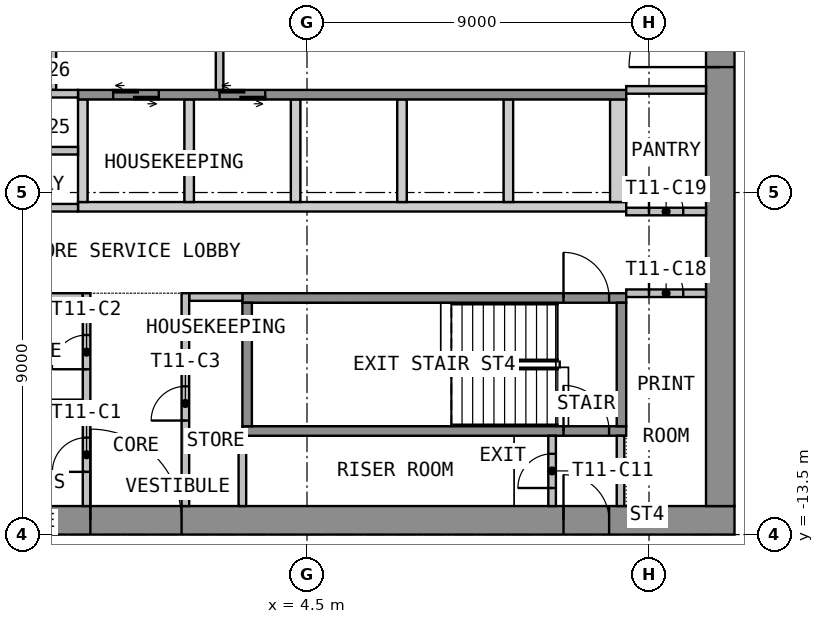
"""IFC4 building model, lengths in metres.
Left out: names, types, materials, properties, quantities, classifications, styles, units other than length and angle.
Written with IfcOpenShell. Run it as: python <this file> out.ifc"""

import sys

from ifc_helpers import new_model, si_unit, direction, frame, frame_2d, origin, place, context, subcontext, project, spatial, polyline, rectangle, outline, extrude, element, fill, save


model = new_model("IFC4")
c1 = context("Model", 3, precision=1e-05, world=origin(), true_north=direction((0.0, 1.0)))
c2 = subcontext(c1, "Body", "Model", "MODEL_VIEW")
j1 = project(units=[si_unit("LENGTHUNIT", "METRE"), si_unit("PLANEANGLEUNIT", "RADIAN")], contexts=[c1])
p1 = place(None, origin())
s1 = spatial("IfcSite", under=j1, at=p1, CompositionType="ELEMENT")
p2 = place(p1, origin())
s2 = spatial("IfcBuilding", under=s1, at=p2, CompositionType="ELEMENT")
p3 = place(p2, frame((0.0, 0.0, 156.0)))
s3 = spatial("IfcBuildingStorey", under=s2, at=p3, CompositionType="ELEMENT", Elevation=156.0)
p4 = place(p3, frame((-15.75, -13.125, 0.0), z_axis=(0.0, 0.0, 1.0), x_axis=(1.0, 0.0, 0.0)))
e1 = element("IfcWall", 1, at=p4, inside=s3, PredefinedType="SHEAR", context=c2, shape_type="SweptSolid", body=[
    extrude(rectangle(XDim=31.5, YDim=0.75, at=frame_2d((15.75, 0.0))), origin(), (0.0, 0.0, 1.0), 3.575),
])
p5 = place(p4, frame((14.55, 0.0, 0.0)))
e2 = element("IfcOpeningElement", 2, at=p5, cuts=e1, PredefinedType="OPENING", context=c2, shape_type="SweptSolid", body=[
    extrude(rectangle(XDim=2.4, YDim=2.1, at=frame_2d((1.2, 1.05))), frame((0.0, 0.385, 0.0), z_axis=(0.0, -1.0, 0.0), x_axis=(1.0, 0.0, 0.0)), (0.0, 0.0, 1.0), 0.77),
])
p6 = place(p4, frame((3.3, 0.0, 0.0)))
e3 = element("IfcOpeningElement", 3, at=p6, cuts=e1, PredefinedType="OPENING", context=c2, shape_type="SweptSolid", body=[
    extrude(rectangle(XDim=1.2, YDim=2.1, at=frame_2d((0.6, 1.05))), frame((0.0, 0.385, 0.0), z_axis=(0.0, -1.0, 0.0), x_axis=(1.0, 0.0, 0.0)), (0.0, 0.0, 1.0), 0.77),
])
p7 = place(p4, frame((27.0, 0.0, 0.0)))
e4 = element("IfcOpeningElement", 4, at=p7, cuts=e1, PredefinedType="OPENING", context=c2, shape_type="SweptSolid", body=[
    extrude(rectangle(XDim=1.2, YDim=2.1, at=frame_2d((0.6, 1.05))), frame((0.0, 0.385, 0.0), z_axis=(0.0, -1.0, 0.0), x_axis=(1.0, 0.0, 0.0)), (0.0, 0.0, 1.0), 0.77),
])
p8 = place(p3, frame((15.375, -12.75, 0.0), z_axis=(0.0, 0.0, 1.0), x_axis=(0.0, 1.0, 0.0)))
e5 = element("IfcWall", 5, at=p8, inside=s3, PredefinedType="SHEAR", context=c2, shape_type="SweptSolid", body=[
    extrude(rectangle(XDim=25.5, YDim=0.75, at=frame_2d((12.75, 0.0))), origin(), (0.0, 0.0, 1.0), 3.575),
])
p9 = place(p8, frame((11.55, 0.0, 0.0)))
e6 = element("IfcOpeningElement", 6, at=p9, cuts=e5, PredefinedType="OPENING", context=c2, shape_type="SweptSolid", body=[
    extrude(rectangle(XDim=2.4, YDim=2.1, at=frame_2d((1.2, 1.05))), frame((0.0, 0.385, 0.0), z_axis=(0.0, -1.0, 0.0), x_axis=(1.0, 0.0, 0.0)), (0.0, 0.0, 1.0), 0.77),
])
p10 = place(p3, origin())
e7 = element("IfcWall", 7, at=p10, inside=s3, PredefinedType="SHEAR", context=c2, shape_type="SweptSolid", body=[
    extrude(outline(polyline([(-1.525, -5.0), (12.9, -5.0), (12.9, -4.75), (-1.525, -4.75), (-1.525, -5.0)])), origin(), (0.0, 0.0, 1.0), 3.575),
])
p11 = place(p3, origin())
e8 = element("IfcWall", 8, at=p11, inside=s3, PredefinedType="SHEAR", context=c2, shape_type="SweptSolid", body=[
    extrude(outline(polyline([(-1.525, -4.75), (-1.275, -4.75), (-1.275, -2.05), (-1.525, -2.05), (-1.525, -4.75)])), origin(), (0.0, 0.0, 1.0), 3.575),
])
p12 = place(p3, origin())
e9 = element("IfcWall", 9, at=p12, inside=s3, PredefinedType="SHEAR", context=c2, shape_type="SweptSolid", body=[
    extrude(outline(polyline([(1.275, -4.75), (1.525, -4.75), (1.525, -2.05), (1.275, -2.05), (1.275, -4.75)])), origin(), (0.0, 0.0, 1.0), 3.575),
])
p13 = place(p3, origin())
e10 = element("IfcWall", 10, at=p13, inside=s3, PredefinedType="SHEAR", context=c2, shape_type="SweptSolid", body=[
    extrude(outline(polyline([(4.075, -4.75), (4.325, -4.75), (4.325, -2.05), (4.075, -2.05), (4.075, -4.75)])), origin(), (0.0, 0.0, 1.0), 3.575),
])
p14 = place(p3, origin())
e11 = element("IfcWall", 11, at=p14, inside=s3, PredefinedType="SHEAR", context=c2, shape_type="SweptSolid", body=[
    extrude(outline(polyline([(6.875, -4.75), (7.125, -4.75), (7.125, -2.05), (6.875, -2.05), (6.875, -4.75)])), origin(), (0.0, 0.0, 1.0), 3.575),
])
p15 = place(p3, origin())
e12 = element("IfcWall", 12, at=p15, inside=s3, PredefinedType="SHEAR", context=c2, shape_type="SweptSolid", body=[
    extrude(outline(polyline([(9.675, -4.75), (9.925, -4.75), (9.925, -2.05), (9.675, -2.05), (9.675, -4.75)])), origin(), (0.0, 0.0, 1.0), 3.575),
])
p16 = place(p3, origin())
e13 = element("IfcWall", 13, at=p16, inside=s3, PredefinedType="SHEAR", context=c2, shape_type="SweptSolid", body=[
    extrude(outline(polyline([(12.475, -4.75), (12.9, -4.75), (12.9, -2.05), (12.475, -2.05), (12.475, -4.75)])), origin(), (0.0, 0.0, 1.0), 3.575),
])
p17 = place(p3, frame((-1.525, -1.925, 0.0), z_axis=(0.0, 0.0, 1.0), x_axis=(1.0, 0.0, 0.0)))
e14 = element("IfcWall", 14, at=p17, inside=s3, PredefinedType="SHEAR", context=c2, shape_type="SweptSolid", body=[
    extrude(rectangle(XDim=14.425, YDim=0.25, at=frame_2d((7.212, 0.0))), origin(), (0.0, 0.0, 1.0), 3.575),
])
p18 = place(p17, frame((0.925, 0.0, 0.0)))
e15 = element("IfcOpeningElement", 15, at=p18, cuts=e14, PredefinedType="OPENING", context=c2, shape_type="SweptSolid", body=[
    extrude(rectangle(XDim=1.2, YDim=2.1, at=frame_2d((0.6, 1.05))), frame((0.0, 0.135, 0.0), z_axis=(0.0, -1.0, 0.0), x_axis=(1.0, 0.0, 0.0)), (0.0, 0.0, 1.0), 0.27),
])
p19 = place(p17, frame((3.725, 0.0, 0.0)))
e16 = element("IfcOpeningElement", 16, at=p19, cuts=e14, PredefinedType="OPENING", context=c2, shape_type="SweptSolid", body=[
    extrude(rectangle(XDim=1.2, YDim=2.1, at=frame_2d((0.6, 1.05))), frame((0.0, 0.135, 0.0), z_axis=(0.0, -1.0, 0.0), x_axis=(1.0, 0.0, 0.0)), (0.0, 0.0, 1.0), 0.27),
])
p20 = place(p3, frame((-2.2, -1.8, 0.0), z_axis=(0.0, 0.0, 1.0), x_axis=(0.0, 1.0, 0.0)))
e17 = element("IfcWall", 17, at=p20, inside=s3, PredefinedType="PARTITIONING", context=c2, shape_type="SweptSolid", body=[
    extrude(rectangle(XDim=3.6, YDim=0.2, at=frame_2d((1.8, 0.0))), origin(), (0.0, 0.0, 1.0), 3.575),
])
p21 = place(p20, frame((1.2, 0.0, 0.0)))
e18 = element("IfcOpeningElement", 18, at=p21, cuts=e17, PredefinedType="OPENING", context=c2, shape_type="SweptSolid", body=[
    extrude(rectangle(XDim=1.2, YDim=2.1, at=frame_2d((0.6, 1.05))), frame((0.0, 0.11, 0.0), z_axis=(0.0, -1.0, 0.0), x_axis=(1.0, 0.0, 0.0)), (0.0, 0.0, 1.0), 0.22),
])
p22 = place(p3, frame((2.2, -1.8, 0.0), z_axis=(0.0, 0.0, 1.0), x_axis=(0.0, 1.0, 0.0)))
e19 = element("IfcWall", 19, at=p22, inside=s3, PredefinedType="PARTITIONING", context=c2, shape_type="SweptSolid", body=[
    extrude(rectangle(XDim=3.6, YDim=0.2, at=frame_2d((1.8, 0.0))), origin(), (0.0, 0.0, 1.0), 3.575),
])
p23 = place(p22, frame((1.2, 0.0, 0.0)))
e20 = element("IfcOpeningElement", 20, at=p23, cuts=e19, PredefinedType="OPENING", context=c2, shape_type="SweptSolid", body=[
    extrude(rectangle(XDim=1.2, YDim=2.1, at=frame_2d((0.6, 1.05))), frame((0.0, 0.11, 0.0), z_axis=(0.0, -1.0, 0.0), x_axis=(1.0, 0.0, 0.0)), (0.0, 0.0, 1.0), 0.22),
])
p24 = place(p3, frame((2.8, -10.775, 0.0), z_axis=(0.0, 0.0, 1.0), x_axis=(1.0, 0.0, 0.0)))
e21 = element("IfcWall", 21, at=p24, inside=s3, PredefinedType="SHEAR", context=c2, shape_type="SweptSolid", body=[
    extrude(rectangle(XDim=10.1, YDim=0.25, at=frame_2d((5.05, 0.0))), origin(), (0.0, 0.0, 1.0), 3.575),
])
p25 = place(p24, frame((8.45, 0.0, 0.0)))
e22 = element("IfcOpeningElement", 22, at=p25, cuts=e21, PredefinedType="OPENING", context=c2, shape_type="SweptSolid", body=[
    extrude(rectangle(XDim=1.2, YDim=2.1, at=frame_2d((0.6, 1.05))), frame((0.0, 0.135, 0.0), z_axis=(0.0, -1.0, 0.0), x_axis=(1.0, 0.0, 0.0)), (0.0, 0.0, 1.0), 0.27),
])
p26 = place(p3, frame((2.8, -7.275, 0.0), z_axis=(0.0, 0.0, 1.0), x_axis=(1.0, 0.0, 0.0)))
e23 = element("IfcWall", 23, at=p26, inside=s3, PredefinedType="SHEAR", context=c2, shape_type="SweptSolid", body=[
    extrude(rectangle(XDim=10.1, YDim=0.25, at=frame_2d((5.05, 0.0))), origin(), (0.0, 0.0, 1.0), 3.575),
])
p27 = place(p26, frame((8.45, 0.0, 0.0)))
e24 = element("IfcOpeningElement", 24, at=p27, cuts=e23, PredefinedType="OPENING", context=c2, shape_type="SweptSolid", body=[
    extrude(rectangle(XDim=1.2, YDim=2.1, at=frame_2d((0.6, 1.05))), frame((0.0, 0.135, 0.0), z_axis=(0.0, -1.0, 0.0), x_axis=(1.0, 0.0, 0.0)), (0.0, 0.0, 1.0), 0.27),
])
for number, where, z_axis, x_axis in (
    (25, (2.925, -10.65, 0.0), (0.0, 0.0, 1.0), (0.0, 1.0, 0.0)),
    (26, (12.775, -10.65, 0.0), (0.0, 0.0, 1.0), (0.0, 1.0, 0.0)),
):
    element("IfcWall", number, at=place(p3, frame(where, z_axis=z_axis, x_axis=x_axis)), inside=s3, PredefinedType="SHEAR", context=c2, shape_type="SweptSolid", body=[
        extrude(rectangle(XDim=3.25, YDim=0.25, at=frame_2d((1.625, 0.0))), origin(), (0.0, 0.0, 1.0), 3.575),
    ])
for number, where, z_axis, x_axis in (
    (27, (-2.8, -7.25, 0.0), (0.0, 0.0, 1.0), (1.0, 0.0, 0.0)),
    (28, (-2.8, -10.05, 0.0), (0.0, 0.0, 1.0), (1.0, 0.0, 0.0)),
    (29, (1.4, -7.25, 0.0), (0.0, 0.0, 1.0), (1.0, 0.0, 0.0)),
):
    element("IfcWall", number, at=place(p3, frame(where, z_axis=z_axis, x_axis=x_axis)), inside=s3, PredefinedType="PARTITIONING", context=c2, shape_type="SweptSolid", body=[
        extrude(rectangle(XDim=1.4, YDim=0.2, at=frame_2d((0.7, 0.0))), origin(), (0.0, 0.0, 1.0), 3.575),
    ])
p28 = place(p3, frame((-1.3, -12.75, 0.0), z_axis=(0.0, 0.0, 1.0), x_axis=(0.0, 1.0, 0.0)))
e30 = element("IfcWall", 30, at=p28, inside=s3, PredefinedType="PARTITIONING", context=c2, shape_type="SweptSolid", body=[
    extrude(rectangle(XDim=5.6, YDim=0.2, at=frame_2d((2.8, 0.0))), origin(), (0.0, 0.0, 1.0), 3.575),
])
p29 = place(p28, frame((0.9, 0.0, 0.0)))
e31 = element("IfcOpeningElement", 31, at=p29, cuts=e30, PredefinedType="OPENING", context=c2, shape_type="SweptSolid", body=[
    extrude(rectangle(XDim=0.9, YDim=2.1, at=frame_2d((0.45, 1.05))), frame((0.0, 0.11, 0.0), z_axis=(0.0, -1.0, 0.0), x_axis=(1.0, 0.0, 0.0)), (0.0, 0.0, 1.0), 0.22),
])
p30 = place(p28, frame((3.6, 0.0, 0.0)))
e32 = element("IfcOpeningElement", 32, at=p30, cuts=e30, PredefinedType="OPENING", context=c2, shape_type="SweptSolid", body=[
    extrude(rectangle(XDim=0.9, YDim=2.1, at=frame_2d((0.45, 1.05))), frame((0.0, 0.11, 0.0), z_axis=(0.0, -1.0, 0.0), x_axis=(1.0, 0.0, 0.0)), (0.0, 0.0, 1.0), 0.22),
])
p31 = place(p3, frame((1.3, -12.75, 0.0), z_axis=(0.0, 0.0, 1.0), x_axis=(0.0, 1.0, 0.0)))
e33 = element("IfcWall", 33, at=p31, inside=s3, PredefinedType="PARTITIONING", context=c2, shape_type="SweptSolid", body=[
    extrude(rectangle(XDim=5.6, YDim=0.2, at=frame_2d((2.8, 0.0))), origin(), (0.0, 0.0, 1.0), 3.575),
])
p32 = place(p31, frame((2.25, 0.0, 0.0)))
e34 = element("IfcOpeningElement", 34, at=p32, cuts=e33, PredefinedType="OPENING", context=c2, shape_type="SweptSolid", body=[
    extrude(rectangle(XDim=0.9, YDim=2.1, at=frame_2d((0.45, 1.05))), frame((0.0, 0.11, 0.0), z_axis=(0.0, -1.0, 0.0), x_axis=(1.0, 0.0, 0.0)), (0.0, 0.0, 1.0), 0.22),
])
p33 = place(p3, frame((12.75, -12.75, 0.0), z_axis=(0.0, 0.0, 1.0), x_axis=(0.0, 1.0, 0.0)))
e35 = element("IfcWall", 35, at=p33, inside=s3, PredefinedType="PARTITIONING", context=c2, shape_type="SweptSolid", body=[
    extrude(rectangle(XDim=1.85, YDim=0.2, at=frame_2d((0.925, 0.0))), origin(), (0.0, 0.0, 1.0), 3.575),
])
p34 = place(p3, frame((10.95, -12.75, 0.0), z_axis=(0.0, 0.0, 1.0), x_axis=(0.0, 1.0, 0.0)))
e36 = element("IfcWall", 36, at=p34, inside=s3, PredefinedType="PARTITIONING", context=c2, shape_type="SweptSolid", body=[
    extrude(rectangle(XDim=1.85, YDim=0.2, at=frame_2d((0.925, 0.0))), origin(), (0.0, 0.0, 1.0), 3.575),
])
p35 = place(p34, frame((0.475, 0.0, 0.0)))
e37 = element("IfcOpeningElement", 37, at=p35, cuts=e36, PredefinedType="OPENING", context=c2, shape_type="SweptSolid", body=[
    extrude(rectangle(XDim=0.9, YDim=2.1, at=frame_2d((0.45, 1.05))), frame((0.0, 0.11, 0.0), z_axis=(0.0, -1.0, 0.0), x_axis=(1.0, 0.0, 0.0)), (0.0, 0.0, 1.0), 0.22),
])
p36 = place(p3, frame((12.9, -7.15, 0.0), z_axis=(0.0, 0.0, 1.0), x_axis=(1.0, 0.0, 0.0)))
e38 = element("IfcWall", 38, at=p36, inside=s3, PredefinedType="PARTITIONING", context=c2, shape_type="SweptSolid", body=[
    extrude(rectangle(XDim=2.1, YDim=0.2, at=frame_2d((1.05, 0.0))), origin(), (0.0, 0.0, 1.0), 3.575),
])
p37 = place(p36, frame((0.6, 0.0, 0.0)))
e39 = element("IfcOpeningElement", 39, at=p37, cuts=e38, PredefinedType="OPENING", context=c2, shape_type="SweptSolid", body=[
    extrude(rectangle(XDim=0.9, YDim=2.1, at=frame_2d((0.45, 1.05))), frame((0.0, 0.11, 0.0), z_axis=(0.0, -1.0, 0.0), x_axis=(1.0, 0.0, 0.0)), (0.0, 0.0, 1.0), 0.22),
])
p38 = place(p3, frame((12.9, -5.0, 0.0), z_axis=(0.0, 0.0, 1.0), x_axis=(1.0, 0.0, 0.0)))
e40 = element("IfcWall", 40, at=p38, inside=s3, PredefinedType="PARTITIONING", context=c2, shape_type="SweptSolid", body=[
    extrude(rectangle(XDim=2.1, YDim=0.2, at=frame_2d((1.05, 0.0))), origin(), (0.0, 0.0, 1.0), 3.575),
])
p39 = place(p38, frame((0.6, 0.0, 0.0)))
e41 = element("IfcOpeningElement", 41, at=p39, cuts=e40, PredefinedType="OPENING", context=c2, shape_type="SweptSolid", body=[
    extrude(rectangle(XDim=0.9, YDim=2.1, at=frame_2d((0.45, 1.05))), frame((0.0, 0.11, 0.0), z_axis=(0.0, -1.0, 0.0), x_axis=(1.0, 0.0, 0.0)), (0.0, 0.0, 1.0), 0.22),
])
p40 = place(p3, frame((12.9, -1.8, 0.0), z_axis=(0.0, 0.0, 1.0), x_axis=(1.0, 0.0, 0.0)))
e42 = element("IfcWall", 42, at=p40, inside=s3, PredefinedType="PARTITIONING", context=c2, shape_type="SweptSolid", body=[
    extrude(rectangle(XDim=2.1, YDim=0.2, at=frame_2d((1.05, 0.0))), origin(), (0.0, 0.0, 1.0), 3.575),
])
p41 = place(p3, frame((-4.075, -3.4, 0.0), z_axis=(0.0, 0.0, 1.0), x_axis=(1.0, 0.0, 0.0)))
e43 = element("IfcWall", 43, at=p41, inside=s3, PredefinedType="PARTITIONING", context=c2, shape_type="SweptSolid", body=[
    extrude(rectangle(XDim=2.55, YDim=0.2, at=frame_2d((1.275, 0.0))), origin(), (0.0, 0.0, 1.0), 3.575),
])
p42 = place(p41, frame((0.825, 0.0, 0.0)))
e44 = element("IfcOpeningElement", 44, at=p42, cuts=e43, PredefinedType="OPENING", context=c2, shape_type="SweptSolid", body=[
    extrude(rectangle(XDim=0.9, YDim=2.1, at=frame_2d((0.45, 1.05))), frame((0.0, 0.11, 0.0), z_axis=(0.0, -1.0, 0.0), x_axis=(1.0, 0.0, 0.0)), (0.0, 0.0, 1.0), 0.22),
])
p43 = place(p3, frame((-4.075, -1.9, 0.0), z_axis=(0.0, 0.0, 1.0), x_axis=(1.0, 0.0, 0.0)))
e45 = element("IfcWall", 45, at=p43, inside=s3, PredefinedType="PARTITIONING", context=c2, shape_type="SweptSolid", body=[
    extrude(rectangle(XDim=2.55, YDim=0.2, at=frame_2d((1.275, 0.0))), origin(), (0.0, 0.0, 1.0), 3.575),
])
p44 = place(p43, frame((0.825, 0.0, 0.0)))
e46 = element("IfcOpeningElement", 46, at=p44, cuts=e45, PredefinedType="OPENING", context=c2, shape_type="SweptSolid", body=[
    extrude(rectangle(XDim=0.9, YDim=2.1, at=frame_2d((0.45, 1.05))), frame((0.0, 0.11, 0.0), z_axis=(0.0, -1.0, 0.0), x_axis=(1.0, 0.0, 0.0)), (0.0, 0.0, 1.0), 0.22),
])
p45 = place(p3, frame((-4.075, -4.9, 0.0), z_axis=(0.0, 0.0, 1.0), x_axis=(1.0, 0.0, 0.0)))
e47 = element("IfcWall", 47, at=p45, inside=s3, PredefinedType="PARTITIONING", context=c2, shape_type="SweptSolid", body=[
    extrude(rectangle(XDim=2.55, YDim=0.2, at=frame_2d((1.275, 0.0))), origin(), (0.0, 0.0, 1.0), 3.575),
])
p46 = place(p3, frame((2.8, -10.901, 0.0), z_axis=(0.0, 0.0, 1.0), x_axis=(0.0, -1.0, 0.0)))
e48 = element("IfcWall", 48, at=p46, inside=s3, PredefinedType="PARTITIONING", context=c2, shape_type="SweptSolid", body=[
    extrude(rectangle(XDim=1.848, YDim=0.2, at=frame_2d((0.924, 0.0))), origin(), (0.0, 0.0, 1.0), 3.575),
])
p47 = place(p9, origin())
e49 = element("IfcDoor", 49, at=p47, inside=s3, OperationType="DOUBLE_DOOR_DOUBLE_SWING", PredefinedType="DOOR", context=c2, shape_type="SweptSolid", body=[
    extrude(rectangle(XDim=2.4, YDim=2.1, at=frame_2d((1.2, 1.05))), frame((0.0, 0.025, 0.0), z_axis=(0.0, -1.0, 0.0), x_axis=(1.0, 0.0, 0.0)), (0.0, 0.0, 1.0), 0.05),
])
fill(e6, e49)
p48 = place(p5, origin())
e50 = element("IfcDoor", 50, at=p48, inside=s3, OperationType="DOUBLE_DOOR_DOUBLE_SWING", PredefinedType="DOOR", context=c2, shape_type="SweptSolid", body=[
    extrude(rectangle(XDim=2.4, YDim=2.1, at=frame_2d((1.2, 1.05))), frame((0.0, 0.025, 0.0), z_axis=(0.0, -1.0, 0.0), x_axis=(1.0, 0.0, 0.0)), (0.0, 0.0, 1.0), 0.05),
])
fill(e2, e50)
p49 = place(p7, origin())
e51 = element("IfcDoor", 51, at=p49, inside=s3, OperationType="SINGLE_SWING_RIGHT", PredefinedType="DOOR", context=c2, shape_type="SweptSolid", body=[
    extrude(rectangle(XDim=1.2, YDim=2.1, at=frame_2d((0.6, 1.05))), frame((0.0, 0.025, 0.0), z_axis=(0.0, -1.0, 0.0), x_axis=(1.0, 0.0, 0.0)), (0.0, 0.0, 1.0), 0.05),
])
fill(e4, e51)
p50 = place(p18, origin())
e52 = element("IfcDoor", 52, at=p50, inside=s3, OperationType="DOUBLE_DOOR_SLIDING", PredefinedType="DOOR", context=c2, shape_type="SweptSolid", body=[
    extrude(rectangle(XDim=1.2, YDim=2.1, at=frame_2d((0.6, 1.05))), frame((0.0, 0.025, 0.0), z_axis=(0.0, -1.0, 0.0), x_axis=(1.0, 0.0, 0.0)), (0.0, 0.0, 1.0), 0.05),
])
fill(e15, e52)
p51 = place(p19, origin())
e53 = element("IfcDoor", 53, at=p51, inside=s3, OperationType="DOUBLE_DOOR_SLIDING", PredefinedType="DOOR", context=c2, shape_type="SweptSolid", body=[
    extrude(rectangle(XDim=1.2, YDim=2.1, at=frame_2d((0.6, 1.05))), frame((0.0, 0.025, 0.0), z_axis=(0.0, -1.0, 0.0), x_axis=(1.0, 0.0, 0.0)), (0.0, 0.0, 1.0), 0.05),
])
fill(e16, e53)
p52 = place(p27, origin())
e54 = element("IfcDoor", 54, at=p52, inside=s3, OperationType="SINGLE_SWING_LEFT", PredefinedType="DOOR", context=c2, shape_type="SweptSolid", body=[
    extrude(rectangle(XDim=1.2, YDim=2.1, at=frame_2d((0.6, 1.05))), frame((0.0, 0.025, 0.0), z_axis=(0.0, -1.0, 0.0), x_axis=(1.0, 0.0, 0.0)), (0.0, 0.0, 1.0), 0.05),
])
fill(e24, e54)
p53 = place(p29, origin())
e55 = element("IfcDoor", 55, at=p53, inside=s3, OperationType="SINGLE_SWING_LEFT", PredefinedType="DOOR", context=c2, shape_type="SweptSolid", body=[
    extrude(rectangle(XDim=0.9, YDim=2.1, at=frame_2d((0.45, 1.05))), frame((0.0, 0.025, 0.0), z_axis=(0.0, -1.0, 0.0), x_axis=(1.0, 0.0, 0.0)), (0.0, 0.0, 1.0), 0.05),
])
fill(e31, e55)
p54 = place(p30, origin())
e56 = element("IfcDoor", 56, at=p54, inside=s3, OperationType="SINGLE_SWING_LEFT", PredefinedType="DOOR", context=c2, shape_type="SweptSolid", body=[
    extrude(rectangle(XDim=0.9, YDim=2.1, at=frame_2d((0.45, 1.05))), frame((0.0, 0.025, 0.0), z_axis=(0.0, -1.0, 0.0), x_axis=(1.0, 0.0, 0.0)), (0.0, 0.0, 1.0), 0.05),
])
fill(e32, e56)
p55 = place(p32, origin())
e57 = element("IfcDoor", 57, at=p55, inside=s3, OperationType="SINGLE_SWING_LEFT", PredefinedType="DOOR", context=c2, shape_type="SweptSolid", body=[
    extrude(rectangle(XDim=0.9, YDim=2.1, at=frame_2d((0.45, 1.05))), frame((0.0, 0.025, 0.0), z_axis=(0.0, -1.0, 0.0), x_axis=(1.0, 0.0, 0.0)), (0.0, 0.0, 1.0), 0.05),
])
fill(e34, e57)
p56 = place(p25, origin())
e58 = element("IfcDoor", 58, at=p56, inside=s3, OperationType="SINGLE_SWING_RIGHT", PredefinedType="DOOR", context=c2, shape_type="SweptSolid", body=[
    extrude(rectangle(XDim=1.2, YDim=2.1, at=frame_2d((0.6, 1.05))), frame((0.0, 0.025, 0.0), z_axis=(0.0, -1.0, 0.0), x_axis=(1.0, 0.0, 0.0)), (0.0, 0.0, 1.0), 0.05),
])
fill(e22, e58)
p57 = place(p35, origin())
e59 = element("IfcDoor", 59, at=p57, inside=s3, OperationType="SINGLE_SWING_LEFT", PredefinedType="DOOR", context=c2, shape_type="SweptSolid", body=[
    extrude(rectangle(XDim=0.9, YDim=2.1, at=frame_2d((0.45, 1.05))), frame((0.0, 0.025, 0.0), z_axis=(0.0, -1.0, 0.0), x_axis=(1.0, 0.0, 0.0)), (0.0, 0.0, 1.0), 0.05),
])
fill(e37, e59)
p58 = place(p37, origin())
e60 = element("IfcDoor", 60, at=p58, inside=s3, OperationType="SINGLE_SWING_LEFT", PredefinedType="DOOR", context=c2, shape_type="SweptSolid", body=[
    extrude(rectangle(XDim=0.9, YDim=2.1, at=frame_2d((0.45, 1.05))), frame((0.0, 0.025, 0.0), z_axis=(0.0, -1.0, 0.0), x_axis=(1.0, 0.0, 0.0)), (0.0, 0.0, 1.0), 0.05),
])
fill(e39, e60)
p59 = place(p39, origin())
e61 = element("IfcDoor", 61, at=p59, inside=s3, OperationType="SINGLE_SWING_LEFT", PredefinedType="DOOR", context=c2, shape_type="SweptSolid", body=[
    extrude(rectangle(XDim=0.9, YDim=2.1, at=frame_2d((0.45, 1.05))), frame((0.0, 0.025, 0.0), z_axis=(0.0, -1.0, 0.0), x_axis=(1.0, 0.0, 0.0)), (0.0, 0.0, 1.0), 0.05),
])
fill(e41, e61)
save(model, sys.argv[1])
